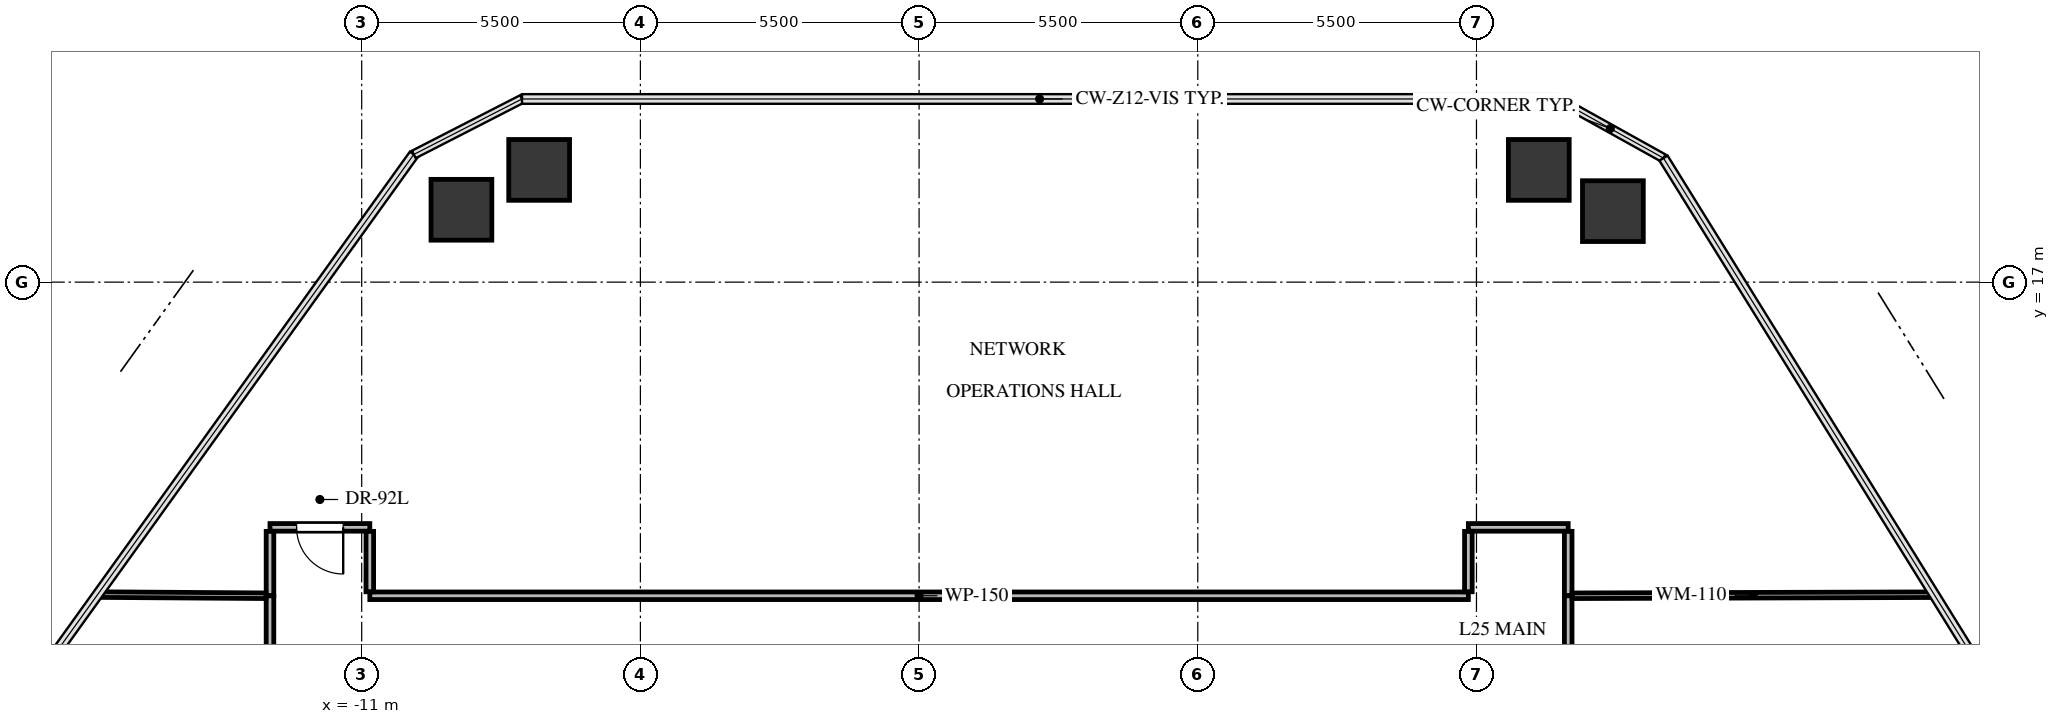
"""IFC4 building model, lengths in metres.
Left out: names, types, materials, properties, quantities, classifications, styles, units other than length and angle.
Written with IfcOpenShell. Run it as: python <this file> out.ifc"""

import sys

from ifc_helpers import new_model, si_unit, direction, frame, frame_2d, origin, origin_2d, place, context, subcontext, project, spatial, rectangle, extrude, source, transform, mapped, element, fill, save


model = new_model("IFC4")
c1 = context("Model", 3, precision=1e-05, world=origin(), true_north=direction((0.0, 1.0)))
c2 = subcontext(c1, "Body", "Model", "MODEL_VIEW")
j1 = project(units=[si_unit("LENGTHUNIT", "METRE"), si_unit("PLANEANGLEUNIT", "RADIAN")], contexts=[c1])
p1 = place(None, origin())
s1 = spatial("IfcSite", under=j1, at=p1, CompositionType="ELEMENT")
p2 = place(p1, origin())
s2 = spatial("IfcBuilding", under=s1, at=p2, CompositionType="ELEMENT")
p3 = place(p2, frame((0.0, 0.0, 97.5)))
s3 = spatial("IfcBuildingStorey", under=s2, at=p3, CompositionType="ELEMENT", Elevation=97.5)
m1 = source(origin(), c2, "Body", "SweptSolid", [
    extrude(rectangle(XDim=1.2, YDim=1.2, at=origin_2d()), origin(), (0.0, 0.0, 1.0), 3.3),
])
for number, where, z_axis, x_axis in (
    (1, (-9.032, 18.428, -0.24), (0.0, 0.0, 1.0), (1.0, 0.0, 0.0)),
    (2, (-7.498, 19.215, -0.24), (0.0, 0.0, 1.0), (1.0, 0.0, 0.0)),
    (3, (12.23, 19.215, -0.24), (0.0, 0.0, 1.0), (1.0, 0.0, 0.0)),
    (4, (13.692, 18.401, -0.24), (0.0, 0.0, 1.0), (1.0, 0.0, 0.0)),
):
    element("IfcColumn", number, at=place(p3, frame(where, z_axis=z_axis, x_axis=x_axis)), inside=s3, PredefinedType="COLUMN", context=c2, shape_type="MappedRepresentation", body=[
        mapped(m1, transform((0.0, 0.0, 0.0), x_axis=(1.0, 0.0, 0.0), y_axis=(0.0, 1.0, 0.0), z_axis=(0.0, 0.0, 1.0), scale=1.0)),
    ])
p4 = place(p3, frame((10.84, 10.81, 0.0), z_axis=(0.0, 0.0, 1.0), x_axis=(-1.0, 0.0, 0.0)))
e5 = element("IfcWall", 5, at=p4, inside=s3, PredefinedType="PARTITIONING", context=c2, shape_type="SweptSolid", body=[
    extrude(rectangle(XDim=21.68, YDim=0.15, at=frame_2d((10.84, 0.0))), origin(), (0.0, 0.0, 1.0), 2.212),
])
p5 = place(p3, frame((12.81, 12.16, 0.0), z_axis=(0.0, 0.0, 1.0), x_axis=(-1.0, 0.0, 0.0)))
e6 = element("IfcWall", 6, at=p5, inside=s3, PredefinedType="PARTITIONING", context=c2, shape_type="SweptSolid", body=[
    extrude(rectangle(XDim=1.97, YDim=0.15, at=frame_2d((0.985, 0.0))), origin(), (0.0, 0.0, 1.0), 2.212),
])
p6 = place(p3, frame((-10.84, 12.16, 0.0), z_axis=(0.0, 0.0, 1.0), x_axis=(-1.0, 0.0, 0.0)))
e7 = element("IfcWall", 7, at=p6, inside=s3, PredefinedType="PARTITIONING", context=c2, shape_type="SweptSolid", body=[
    extrude(rectangle(XDim=1.97, YDim=0.15, at=frame_2d((0.985, 0.0))), origin(), (0.0, 0.0, 1.0), 3.045),
])
p7 = place(p6, frame((0.525, 0.0, 0.0)))
e8 = element("IfcOpeningElement", 8, at=p7, cuts=e7, PredefinedType="OPENING", context=c2, shape_type="SweptSolid", body=[
    extrude(rectangle(XDim=0.92, YDim=2.1, at=frame_2d((0.46, 1.05))), frame((0.0, 0.085, 0.0), z_axis=(0.0, -1.0, 0.0), x_axis=(1.0, 0.0, 0.0)), (0.0, 0.0, 1.0), 0.17),
])
p8 = place(p3, frame((12.81, 10.81, 0.0), z_axis=(0.0, 0.0, 1.0), x_axis=(0.0, 1.0, 0.0)))
e9 = element("IfcWall", 9, at=p8, inside=s3, PredefinedType="PARTITIONING", context=c2, shape_type="SweptSolid", body=[
    extrude(rectangle(XDim=1.271, YDim=0.15, at=frame_2d((0.635, 0.0))), origin(), (0.0, 0.0, 1.0), 3.045),
])
p9 = place(p3, frame((10.84, 12.081, 0.0), z_axis=(0.0, 0.0, 1.0), x_axis=(0.0, -1.0, 0.0)))
e10 = element("IfcWall", 10, at=p9, inside=s3, PredefinedType="PARTITIONING", context=c2, shape_type="SweptSolid", body=[
    extrude(rectangle(XDim=1.192, YDim=0.15, at=frame_2d((0.596, 0.0))), origin(), (0.0, 0.0, 1.0), 2.212),
])
p10 = place(p3, frame((-10.84, 10.889, 0.0), z_axis=(0.0, 0.0, 1.0), x_axis=(0.0, 1.0, 0.0)))
e11 = element("IfcWall", 11, at=p10, inside=s3, PredefinedType="PARTITIONING", context=c2, shape_type="SweptSolid", body=[
    extrude(rectangle(XDim=1.192, YDim=0.15, at=frame_2d((0.596, 0.0))), origin(), (0.0, 0.0, 1.0), 3.045),
])
p11 = place(p3, frame((-12.81, 12.081, 0.0), z_axis=(0.0, 0.0, 1.0), x_axis=(0.0, -1.0, 0.0)))
e12 = element("IfcWall", 12, at=p11, inside=s3, PredefinedType="PARTITIONING", context=c2, shape_type="SweptSolid", body=[
    extrude(rectangle(XDim=1.271, YDim=0.15, at=frame_2d((0.635, 0.0))), origin(), (0.0, 0.0, 1.0), 3.045),
])
p12 = place(p3, frame((-12.81, 10.81, 0.0), z_axis=(0.0, 0.0, 1.0), x_axis=(0.0, -1.0, 0.0)))
e13 = element("IfcWall", 13, at=p12, inside=s3, PredefinedType="PARTITIONING", context=c2, shape_type="SweptSolid", body=[
    extrude(rectangle(XDim=21.62, YDim=0.15, at=frame_2d((10.81, 0.0))), origin(), (0.0, 0.0, 1.0), 2.212),
])
p13 = place(p12, frame((10.35, 0.0, 0.0)))
e14 = element("IfcOpeningElement", 14, at=p13, cuts=e13, PredefinedType="OPENING", context=c2, shape_type="SweptSolid", body=[
    extrude(rectangle(XDim=0.92, YDim=2.1, at=frame_2d((0.46, 1.05))), frame((0.0, 0.085, 0.0), z_axis=(0.0, -1.0, 0.0), x_axis=(1.0, 0.0, 0.0)), (0.0, 0.0, 1.0), 0.17),
])
p14 = place(p3, frame((12.81, 2.49, 0.0), z_axis=(0.0, 0.0, 1.0), x_axis=(0.0, 1.0, 0.0)))
e15 = element("IfcWall", 15, at=p14, inside=s3, PredefinedType="PARTITIONING", context=c2, shape_type="SweptSolid", body=[
    extrude(rectangle(XDim=8.32, YDim=0.15, at=frame_2d((4.16, 0.0))), origin(), (0.0, 0.0, 1.0), 3.045),
])
p15 = place(p14, frame((3.685, 0.0, 0.0)))
e16 = element("IfcOpeningElement", 16, at=p15, cuts=e15, PredefinedType="OPENING", context=c2, shape_type="SweptSolid", body=[
    extrude(rectangle(XDim=0.95, YDim=2.1, at=frame_2d((0.475, 1.05))), frame((0.0, 0.085, 0.0), z_axis=(0.0, -1.0, 0.0), x_axis=(1.0, 0.0, 0.0)), (0.0, 0.0, 1.0), 0.17),
])
p16 = place(p3, frame((-12.889, 10.811, 0.0), z_axis=(0.0, 0.0, 1.0), x_axis=(-0.999976657862, 0.006832549348, 0.0)))
e17 = element("IfcWall", 17, at=p16, inside=s3, PredefinedType="MOVABLE", context=c2, shape_type="SweptSolid", body=[
    extrude(rectangle(XDim=3.323, YDim=0.11, at=frame_2d((1.662, 0.0))), origin(), (0.0, 0.0, 1.0), 2.38),
])
p17 = place(p3, frame((20.035, 10.831, 0.0), z_axis=(0.0, 0.0, 1.0), x_axis=(-0.999995783715, -0.002903885812, 0.0)))
e18 = element("IfcWall", 18, at=p17, inside=s3, PredefinedType="MOVABLE", context=c2, shape_type="SweptSolid", body=[
    extrude(rectangle(XDim=7.146, YDim=0.11, at=frame_2d((3.573, 0.0))), origin(), (0.0, 0.0, 1.0), 2.38),
])
m2 = source(origin(), c2, "Body", "SweptSolid", [
    extrude(rectangle(XDim=0.92, YDim=2.1, at=frame_2d((0.46, 1.05))), frame((0.0, 0.025, 0.0), z_axis=(0.0, -1.0, 0.0), x_axis=(1.0, 0.0, 0.0)), (0.0, 0.0, 1.0), 0.05),
])
p18 = place(p7, origin())
e19 = element("IfcDoor", 19, at=p18, inside=s3, OperationType="SINGLE_SWING_LEFT", PredefinedType="DOOR", context=c2, shape_type="MappedRepresentation", body=[
    mapped(m2, transform((0.0, 0.0, 0.0), x_axis=(1.0, 0.0, 0.0), y_axis=(0.0, 1.0, 0.0), z_axis=(0.0, 0.0, 1.0), scale=1.0)),
])
fill(e8, e19)
save(model, sys.argv[1])
